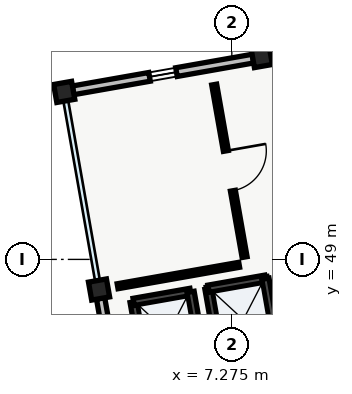
"""IFC4 building model, lengths in metres.
Left out: names, types, materials, properties, quantities, classifications, styles, units other than length and angle.
Written with IfcOpenShell. Run it as: python <this file> out.ifc"""

import sys

from ifc_helpers import new_model, si_unit, direction, frame, frame_2d, origin, origin_2d, place, context, subcontext, project, spatial, rectangle, extrude, element, fill, save


model = new_model("IFC4")
c1 = context("Model", 3, precision=1e-05, world=origin(), true_north=direction((0.0, 1.0)))
c2 = subcontext(c1, "Body", "Model", "MODEL_VIEW")
j1 = project(units=[si_unit("LENGTHUNIT", "METRE"), si_unit("PLANEANGLEUNIT", "RADIAN")], contexts=[c1])
p1 = place(None, origin())
s1 = spatial("IfcSite", under=j1, at=p1, CompositionType="ELEMENT")
p2 = place(p1, origin())
s2 = spatial("IfcBuilding", under=s1, at=p2, CompositionType="ELEMENT")
p3 = place(p2, frame((0.0, 0.0, 32.1)))
s3 = spatial("IfcBuildingStorey", under=s2, at=p3, CompositionType="ELEMENT", Elevation=32.1)
for number, where, z_axis, x_axis in (
    (1, (2.908, 48.01, 0.0), (0.0, 0.0, 1.0), (0.985, 0.174, 0.0)),
    (2, (1.762, 54.509, 0.0), (0.0, 0.0, 1.0), (0.985, 0.174, 0.0)),
    (3, (8.261, 55.655, 0.0), (0.0, 0.0, 1.0), (0.985, 0.174, 0.0)),
):
    element("IfcColumn", number, at=place(p3, frame(where, z_axis=z_axis, x_axis=x_axis)), inside=s3, PredefinedType="COLUMN", context=c2, shape_type="SweptSolid", body=[
        extrude(rectangle(XDim=0.6, YDim=0.6, at=origin_2d()), origin(), (0.0, 0.0, 1.0), 4.31),
    ])
p4 = place(p3, frame((4.003, 41.8, 0.0), z_axis=(0.0, 0.0, 1.0), x_axis=(-0.173660194111, 0.984805634113, 0.0)))
e4 = element("IfcWall", 4, at=p4, inside=s3, PredefinedType="STANDARD", context=c2, shape_type="SweptSolid", body=[
    extrude(rectangle(XDim=6.01, YDim=0.275, at=frame_2d((3.005, 0.0))), origin(), (0.0, 0.0, 1.0), 3.795),
])
p5 = place(p4, frame((1.955, 0.0, 0.95)))
e5 = element("IfcOpeningElement", 5, at=p5, cuts=e4, PredefinedType="OPENING", context=c2, shape_type="SweptSolid", body=[
    extrude(rectangle(XDim=2.1, YDim=1.8, at=frame_2d((1.05, 0.9))), frame((0.0, 0.137, 0.0), z_axis=(0.0, -1.0, 0.0), x_axis=(1.0, 0.0, 0.0)), (0.0, 0.0, 1.0), 0.275),
])
p6 = place(p3, frame((2.052, 54.56, 0.0), z_axis=(0.0, 0.0, 1.0), x_axis=(0.984805634113, 0.173660194111, 0.0)))
e6 = element("IfcWall", 6, at=p6, inside=s3, PredefinedType="STANDARD", context=c2, shape_type="SweptSolid", body=[
    extrude(rectangle(XDim=6.01, YDim=0.29, at=frame_2d((3.005, 0.0))), origin(), (0.0, 0.0, 1.0), 3.795),
])
p7 = place(p6, frame((2.555, 0.0, 0.95)))
e7 = element("IfcOpeningElement", 7, at=p7, cuts=e6, PredefinedType="OPENING", context=c2, shape_type="SweptSolid", body=[
    extrude(rectangle(XDim=0.9, YDim=1.5, at=frame_2d((0.45, 0.75))), frame((0.0, 0.145, 0.0), z_axis=(0.0, -1.0, 0.0), x_axis=(1.0, 0.0, 0.0)), (0.0, 0.0, 1.0), 0.29),
])
p8 = place(p3, frame((4.463, 45.237, 0.0), z_axis=(0.0, 0.0, 1.0), x_axis=(-0.173646056486, 0.984808127031, 0.0)))
e8 = element("IfcWall", 8, at=p8, inside=s3, PredefinedType="SHEAR", context=c2, shape_type="SweptSolid", body=[
    extrude(rectangle(XDim=2.4, YDim=0.24, at=frame_2d((1.2, 0.0))), origin(), (0.0, 0.0, 1.0), 4.28),
])
p9 = place(p3, frame((4.046, 47.601, 0.0), z_axis=(0.0, 0.0, 1.0), x_axis=(0.984793905749, 0.173726691098, 0.0)))
e9 = element("IfcWall", 9, at=p9, inside=s3, PredefinedType="SHEAR", context=c2, shape_type="SweptSolid", body=[
    extrude(rectangle(XDim=1.9, YDim=0.24, at=frame_2d((0.95, 0.0))), origin(), (0.0, 0.0, 1.0), 4.28),
])
p10 = place(p3, frame((5.917, 47.931, 0.0), z_axis=(0.0, 0.0, 1.0), x_axis=(0.173646056486, -0.984808127031, 0.0)))
e10 = element("IfcWall", 10, at=p10, inside=s3, PredefinedType="SHEAR", context=c2, shape_type="SweptSolid", body=[
    extrude(rectangle(XDim=2.4, YDim=0.24, at=frame_2d((1.2, 0.0))), origin(), (0.0, 0.0, 1.0), 4.28),
])
p11 = place(p3, frame((6.925, 45.671, 0.0), z_axis=(0.0, 0.0, 1.0), x_axis=(-0.173646056486, 0.984808127031, 0.0)))
e11 = element("IfcWall", 11, at=p11, inside=s3, PredefinedType="SHEAR", context=c2, shape_type="SweptSolid", body=[
    extrude(rectangle(XDim=2.4, YDim=0.24, at=frame_2d((1.2, 0.0))), origin(), (0.0, 0.0, 1.0), 4.35),
])
p12 = place(p3, frame((6.508, 48.035, 0.0), z_axis=(0.0, 0.0, 1.0), x_axis=(0.984793905749, 0.173726691098, 0.0)))
e12 = element("IfcWall", 12, at=p12, inside=s3, PredefinedType="SHEAR", context=c2, shape_type="SweptSolid", body=[
    extrude(rectangle(XDim=1.9, YDim=0.24, at=frame_2d((0.95, 0.0))), origin(), (0.0, 0.0, 1.0), 4.35),
])
p13 = place(p3, frame((8.379, 48.365, 0.0), z_axis=(0.0, 0.0, 1.0), x_axis=(0.173646056486, -0.984808127031, 0.0)))
e13 = element("IfcWall", 13, at=p13, inside=s3, PredefinedType="SHEAR", context=c2, shape_type="SweptSolid", body=[
    extrude(rectangle(XDim=2.4, YDim=0.24, at=frame_2d((1.2, 0.0))), origin(), (0.0, 0.0, 1.0), 4.35),
])
p14 = place(p3, frame((3.518, 48.117, 0.0), z_axis=(0.0, 0.0, 1.0), x_axis=(0.984816834462, 0.173596666326, 0.0)))
e14 = element("IfcWall", 14, at=p14, inside=s3, PredefinedType="PARTITIONING", context=c2, shape_type="SweptSolid", body=[
    extrude(rectangle(XDim=4.06, YDim=0.165, at=frame_2d((2.03, 0.0))), origin(), (0.0, 0.0, 1.0), 3.695),
])
p15 = place(p3, frame((7.695, 49.077, 0.0), z_axis=(0.0, 0.0, 1.0), x_axis=(-0.173649928941, 0.984807444214, 0.0)))
e15 = element("IfcWall", 15, at=p15, inside=s3, PredefinedType="PARTITIONING", context=c2, shape_type="SweptSolid", body=[
    extrude(rectangle(XDim=5.76, YDim=0.165, at=frame_2d((2.88, 0.0))), origin(), (0.0, 0.0, 1.0), 3.95),
])
p16 = place(p15, frame((2.215, 0.0, 0.0)))
e16 = element("IfcOpeningElement", 16, at=p16, cuts=e15, PredefinedType="OPENING", context=c2, shape_type="SweptSolid", body=[
    extrude(rectangle(XDim=1.33, YDim=2.12, at=frame_2d((0.665, 1.06))), frame((0.0, 0.083, 0.0), z_axis=(0.0, -1.0, 0.0), x_axis=(1.0, 0.0, 0.0)), (0.0, 0.0, 1.0), 0.165),
])
p17 = place(p7, origin())
e17 = element("IfcWindow", 17, at=p17, inside=s3, PartitioningType="SINGLE_PANEL", PredefinedType="WINDOW", context=c2, shape_type="SweptSolid", body=[
    extrude(rectangle(XDim=0.9, YDim=1.5, at=frame_2d((0.45, 0.75))), frame((0.0, 0.03, 0.0), z_axis=(0.0, -1.0, 0.0), x_axis=(1.0, 0.0, 0.0)), (0.0, 0.0, 1.0), 0.06),
])
fill(e7, e17)
p18 = place(p16, origin())
e18 = element("IfcDoor", 18, at=p18, inside=s3, OperationType="SINGLE_SWING_RIGHT", PredefinedType="DOOR", context=c2, shape_type="SweptSolid", body=[
    extrude(rectangle(XDim=1.33, YDim=2.12, at=frame_2d((0.665, 1.06))), frame((0.0, 0.025, 0.0), z_axis=(0.0, -1.0, 0.0), x_axis=(1.0, 0.0, 0.0)), (0.0, 0.0, 1.0), 0.05),
])
fill(e16, e18)
save(model, sys.argv[1])
